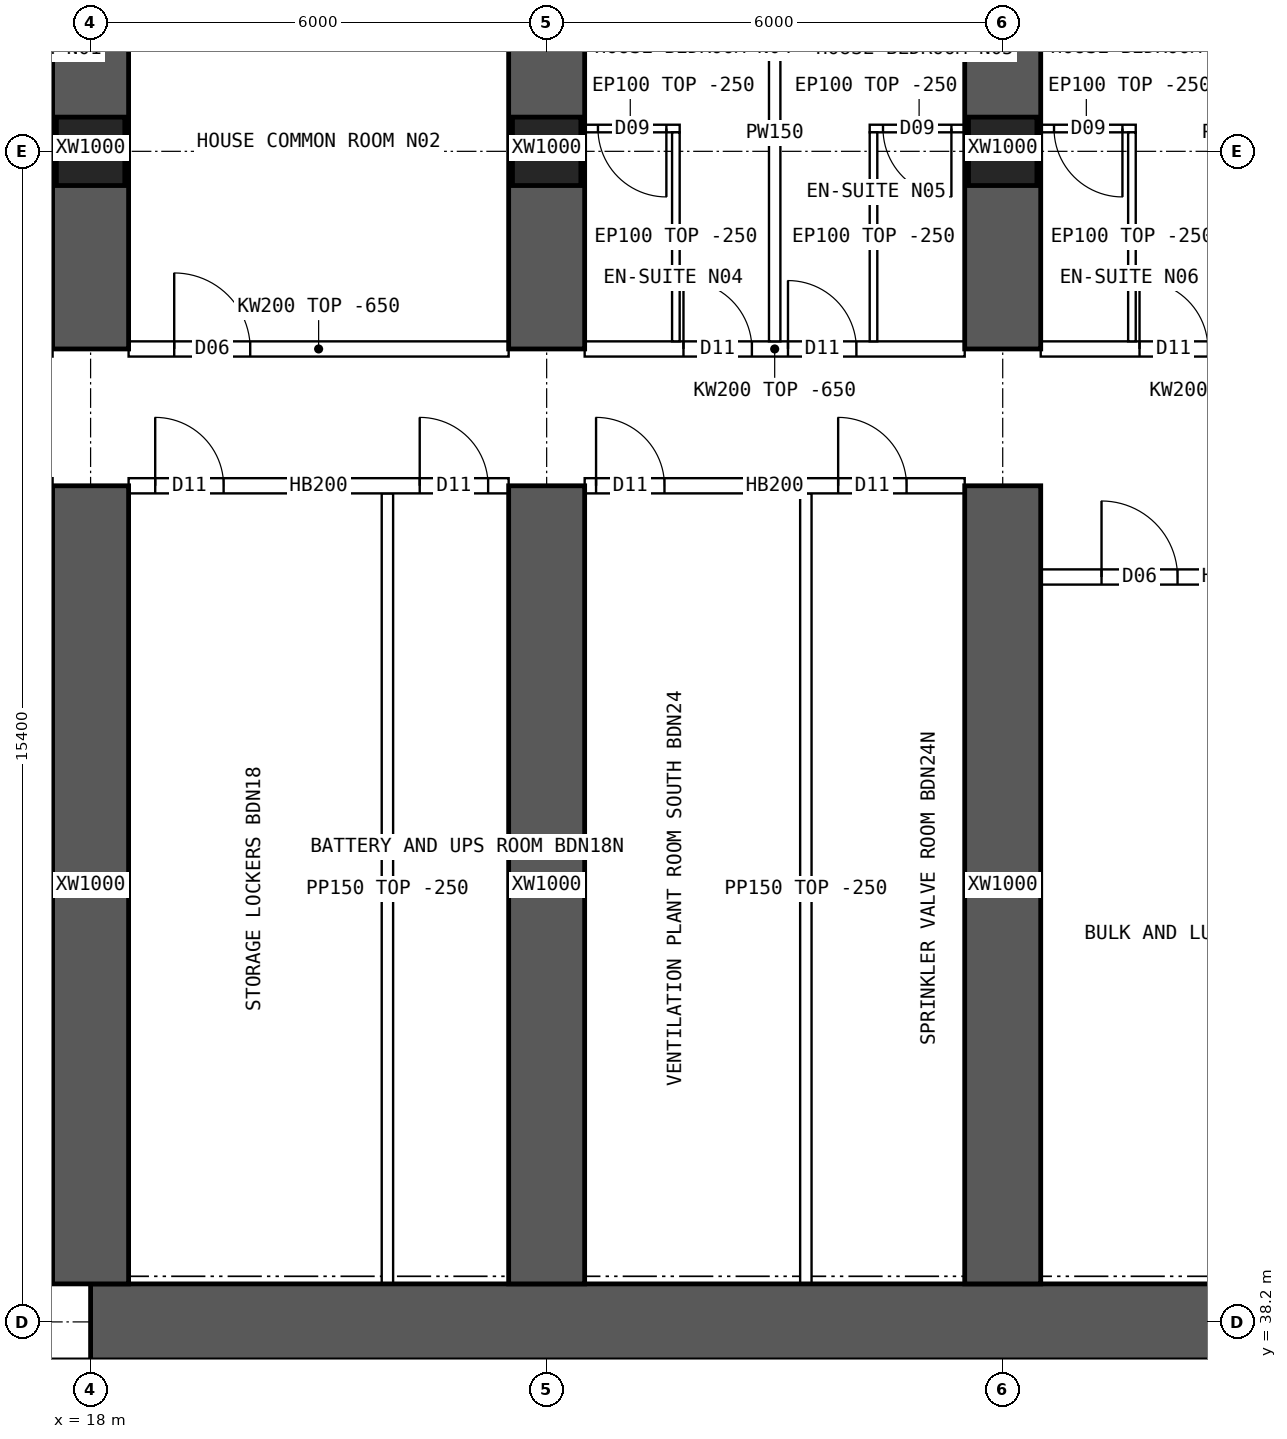
"""IFC4 building model, lengths in metres.
Left out: names, types, materials, properties, quantities, classifications, styles, units other than length and angle.
Written with IfcOpenShell. Run it as: python <this file> out.ifc"""

import sys

from ifc_helpers import new_model, si_unit, direction, frame, frame_2d, origin, origin_2d, place, context, subcontext, project, spatial, polyline, rectangle, hollow_rectangle, outline, extrude, element, fill, save


model = new_model("IFC4")
c1 = context("Model", 3, precision=1e-05, world=origin(), true_north=direction((0.0, 1.0)))
c2 = subcontext(c1, "Body", "Model", "MODEL_VIEW")
j1 = project(units=[si_unit("LENGTHUNIT", "METRE"), si_unit("PLANEANGLEUNIT", "RADIAN")], contexts=[c1])
p1 = place(None, origin())
s1 = spatial("IfcSite", under=j1, at=p1, CompositionType="ELEMENT")
p2 = place(p1, origin())
s2 = spatial("IfcBuilding", under=s1, at=p2, CompositionType="ELEMENT")
p3 = place(p2, frame((0.0, 0.0, 46.45)))
s3 = spatial("IfcBuildingStorey", under=s2, at=p3, CompositionType="ELEMENT", Elevation=46.45)
for number, where, z_axis, x_axis in (
    (1, (18.0, 53.6, 0.0), (0.0, 0.0, 1.0), (1.0, 0.0, 0.0)),
    (2, (24.0, 53.6, 0.0), (0.0, 0.0, 1.0), (1.0, 0.0, 0.0)),
    (3, (30.0, 53.6, 0.0), (0.0, 0.0, 1.0), (1.0, 0.0, 0.0)),
):
    element("IfcColumn", number, at=place(p3, frame(where, z_axis=z_axis, x_axis=x_axis)), inside=s3, PredefinedType="COLUMN", context=c2, shape_type="SweptSolid", body=[
        extrude(hollow_rectangle(XDim=0.9, YDim=0.9, WallThickness=0.09, at=origin_2d()), origin(), (0.0, 0.0, 1.0), 3.75),
    ])
p4 = place(p3, frame((18.0, 38.2, 0.0), z_axis=(0.0, 0.0, 1.0), x_axis=(1.0, 0.0, 0.0)))
e4 = element("IfcWall", 4, at=p4, inside=s3, PredefinedType="SHEAR", context=c2, shape_type="SweptSolid", body=[
    extrude(rectangle(XDim=48.0, YDim=1.0, at=frame_2d((24.0, 0.0))), origin(), (0.0, 0.0, 1.0), 3.75),
])
for number, where, z_axis, x_axis in (
    (5, (21.6, 34.75, 0.0), (0.0, 0.0, 1.0), (0.0, 1.0, 0.0)),
    (6, (26.0, 34.75, 0.0), (0.0, 0.0, 1.0), (0.0, 1.0, 0.0)),
):
    element("IfcWall", number, at=place(p3, frame(where, z_axis=z_axis, x_axis=x_axis)), inside=s3, PredefinedType="SHEAR", context=c2, shape_type="SweptSolid", body=[
        extrude(rectangle(XDim=2.95, YDim=0.3, at=frame_2d((1.475, 0.0))), origin(), (0.0, 0.0, 1.0), 3.75),
    ])
p5 = place(p3, frame((18.0, 51.0, 0.0), z_axis=(0.0, 0.0, 1.0), x_axis=(0.0, 1.0, 0.0)))
e7 = element("IfcWall", 7, at=p5, inside=s3, PredefinedType="SHEAR", context=c2, shape_type="SweptSolid", body=[
    extrude(rectangle(XDim=5.3, YDim=1.0, at=frame_2d((2.65, 0.0))), origin(), (0.0, 0.0, 1.0), 3.75),
])
p6 = place(p3, frame((18.0, 38.7, 0.0), z_axis=(0.0, 0.0, 1.0), x_axis=(0.0, 1.0, 0.0)))
e8 = element("IfcWall", 8, at=p6, inside=s3, PredefinedType="SHEAR", context=c2, shape_type="SweptSolid", body=[
    extrude(rectangle(XDim=10.5, YDim=1.0, at=frame_2d((5.25, 0.0))), origin(), (0.0, 0.0, 1.0), 3.75),
])
p7 = place(p3, frame((24.0, 51.0, 0.0), z_axis=(0.0, 0.0, 1.0), x_axis=(0.0, 1.0, 0.0)))
e9 = element("IfcWall", 9, at=p7, inside=s3, PredefinedType="SHEAR", context=c2, shape_type="SweptSolid", body=[
    extrude(rectangle(XDim=5.3, YDim=1.0, at=frame_2d((2.65, 0.0))), origin(), (0.0, 0.0, 1.0), 3.75),
])
p8 = place(p3, frame((24.0, 38.7, 0.0), z_axis=(0.0, 0.0, 1.0), x_axis=(0.0, 1.0, 0.0)))
e10 = element("IfcWall", 10, at=p8, inside=s3, PredefinedType="SHEAR", context=c2, shape_type="SweptSolid", body=[
    extrude(rectangle(XDim=10.5, YDim=1.0, at=frame_2d((5.25, 0.0))), origin(), (0.0, 0.0, 1.0), 3.75),
])
p9 = place(p3, frame((30.0, 51.0, 0.0), z_axis=(0.0, 0.0, 1.0), x_axis=(0.0, 1.0, 0.0)))
e11 = element("IfcWall", 11, at=p9, inside=s3, PredefinedType="SHEAR", context=c2, shape_type="SweptSolid", body=[
    extrude(rectangle(XDim=5.3, YDim=1.0, at=frame_2d((2.65, 0.0))), origin(), (0.0, 0.0, 1.0), 3.75),
])
p10 = place(p3, frame((30.0, 38.7, 0.0), z_axis=(0.0, 0.0, 1.0), x_axis=(0.0, 1.0, 0.0)))
e12 = element("IfcWall", 12, at=p10, inside=s3, PredefinedType="SHEAR", context=c2, shape_type="SweptSolid", body=[
    extrude(rectangle(XDim=10.5, YDim=1.0, at=frame_2d((5.25, 0.0))), origin(), (0.0, 0.0, 1.0), 3.75),
])
p11 = place(p3, frame((29.651, 34.75, 0.0), z_axis=(0.0, 0.0, 1.0), x_axis=(0.0, 1.0, 0.0)))
e13 = element("IfcWall", 13, at=p11, inside=s3, PredefinedType="SOLIDWALL", context=c2, shape_type="SweptSolid", body=[
    extrude(rectangle(XDim=2.95, YDim=0.15, at=frame_2d((1.475, 0.0))), origin(), (0.0, 0.0, 1.0), 3.5),
])
p12 = place(p3, frame((18.5, 51.0, 0.0), z_axis=(0.0, 0.0, 1.0), x_axis=(1.0, 0.0, 0.0)))
e14 = element("IfcWall", 14, at=p12, inside=s3, PredefinedType="SOLIDWALL", context=c2, shape_type="SweptSolid", body=[
    extrude(outline(polyline([(0.0, 0.0), (5.0, 0.0), (5.0, 3.1), (0.0, 3.1), (0.0, 0.0)])), frame((0.0, 0.1, 0.0), z_axis=(0.0, -1.0, 0.0), x_axis=(1.0, 0.0, 0.0)), (0.0, 0.0, 1.0), 0.2),
])
p13 = place(p12, frame((0.6, 0.0, 0.0)))
e15 = element("IfcOpeningElement", 15, at=p13, cuts=e14, PredefinedType="OPENING", context=c2, shape_type="SweptSolid", body=[
    extrude(rectangle(XDim=1.0, YDim=2.1, at=frame_2d((0.5, 1.05))), frame((0.0, 0.11, 0.0), z_axis=(0.0, -1.0, 0.0), x_axis=(1.0, 0.0, 0.0)), (0.0, 0.0, 1.0), 0.22),
])
p14 = place(p3, frame((18.5, 49.2, 0.0), z_axis=(0.0, 0.0, 1.0), x_axis=(1.0, 0.0, 0.0)))
e16 = element("IfcWall", 16, at=p14, inside=s3, PredefinedType="SOLIDWALL", context=c2, shape_type="SweptSolid", body=[
    extrude(rectangle(XDim=5.0, YDim=0.2, at=frame_2d((2.5, 0.0))), origin(), (0.0, 0.0, 1.0), 3.5),
])
p15 = place(p14, frame((0.35, 0.0, 0.0)))
e17 = element("IfcOpeningElement", 17, at=p15, cuts=e16, PredefinedType="OPENING", context=c2, shape_type="SweptSolid", body=[
    extrude(rectangle(XDim=0.9, YDim=2.1, at=frame_2d((0.45, 1.05))), frame((0.0, 0.11, 0.0), z_axis=(0.0, -1.0, 0.0), x_axis=(1.0, 0.0, 0.0)), (0.0, 0.0, 1.0), 0.22),
])
p16 = place(p14, frame((3.83, 0.0, 0.0)))
e18 = element("IfcOpeningElement", 18, at=p16, cuts=e16, PredefinedType="OPENING", context=c2, shape_type="SweptSolid", body=[
    extrude(rectangle(XDim=0.9, YDim=2.1, at=frame_2d((0.45, 1.05))), frame((0.0, 0.11, 0.0), z_axis=(0.0, -1.0, 0.0), x_axis=(1.0, 0.0, 0.0)), (0.0, 0.0, 1.0), 0.22),
])
p17 = place(p3, frame((24.5, 51.0, 0.0), z_axis=(0.0, 0.0, 1.0), x_axis=(1.0, 0.0, 0.0)))
e19 = element("IfcWall", 19, at=p17, inside=s3, PredefinedType="SOLIDWALL", context=c2, shape_type="SweptSolid", body=[
    extrude(outline(polyline([(0.0, 0.0), (5.0, 0.0), (5.0, 3.1), (0.0, 3.1), (0.0, 0.0)])), frame((0.0, 0.1, 0.0), z_axis=(0.0, -1.0, 0.0), x_axis=(1.0, 0.0, 0.0)), (0.0, 0.0, 1.0), 0.2),
])
p18 = place(p17, frame((1.3, 0.0, 0.0)))
e20 = element("IfcOpeningElement", 20, at=p18, cuts=e19, PredefinedType="OPENING", context=c2, shape_type="SweptSolid", body=[
    extrude(rectangle(XDim=0.9, YDim=2.1, at=frame_2d((0.45, 1.05))), frame((0.0, 0.11, 0.0), z_axis=(0.0, -1.0, 0.0), x_axis=(1.0, 0.0, 0.0)), (0.0, 0.0, 1.0), 0.22),
])
p19 = place(p17, frame((2.675, 0.0, 0.0)))
e21 = element("IfcOpeningElement", 21, at=p19, cuts=e19, PredefinedType="OPENING", context=c2, shape_type="SweptSolid", body=[
    extrude(rectangle(XDim=0.9, YDim=2.1, at=frame_2d((0.45, 1.05))), frame((0.0, 0.11, 0.0), z_axis=(0.0, -1.0, 0.0), x_axis=(1.0, 0.0, 0.0)), (0.0, 0.0, 1.0), 0.22),
])
p20 = place(p3, frame((24.5, 49.2, 0.0), z_axis=(0.0, 0.0, 1.0), x_axis=(1.0, 0.0, 0.0)))
e22 = element("IfcWall", 22, at=p20, inside=s3, PredefinedType="SOLIDWALL", context=c2, shape_type="SweptSolid", body=[
    extrude(rectangle(XDim=5.0, YDim=0.2, at=frame_2d((2.5, 0.0))), origin(), (0.0, 0.0, 1.0), 3.5),
])
p21 = place(p20, frame((0.15, 0.0, 0.0)))
e23 = element("IfcOpeningElement", 23, at=p21, cuts=e22, PredefinedType="OPENING", context=c2, shape_type="SweptSolid", body=[
    extrude(rectangle(XDim=0.9, YDim=2.1, at=frame_2d((0.45, 1.05))), frame((0.0, 0.11, 0.0), z_axis=(0.0, -1.0, 0.0), x_axis=(1.0, 0.0, 0.0)), (0.0, 0.0, 1.0), 0.22),
])
p22 = place(p20, frame((3.335, 0.0, 0.0)))
e24 = element("IfcOpeningElement", 24, at=p22, cuts=e22, PredefinedType="OPENING", context=c2, shape_type="SweptSolid", body=[
    extrude(rectangle(XDim=0.9, YDim=2.1, at=frame_2d((0.45, 1.05))), frame((0.0, 0.11, 0.0), z_axis=(0.0, -1.0, 0.0), x_axis=(1.0, 0.0, 0.0)), (0.0, 0.0, 1.0), 0.22),
])
p23 = place(p3, frame((30.5, 51.0, 0.0), z_axis=(0.0, 0.0, 1.0), x_axis=(1.0, 0.0, 0.0)))
e25 = element("IfcWall", 25, at=p23, inside=s3, PredefinedType="SOLIDWALL", context=c2, shape_type="SweptSolid", body=[
    extrude(outline(polyline([(0.0, 0.0), (5.0, 0.0), (5.0, 3.1), (0.0, 3.1), (0.0, 0.0)])), frame((0.0, 0.1, 0.0), z_axis=(0.0, -1.0, 0.0), x_axis=(1.0, 0.0, 0.0)), (0.0, 0.0, 1.0), 0.2),
])
p24 = place(p23, frame((1.3, 0.0, 0.0)))
e26 = element("IfcOpeningElement", 26, at=p24, cuts=e25, PredefinedType="OPENING", context=c2, shape_type="SweptSolid", body=[
    extrude(rectangle(XDim=0.9, YDim=2.1, at=frame_2d((0.45, 1.05))), frame((0.0, 0.11, 0.0), z_axis=(0.0, -1.0, 0.0), x_axis=(1.0, 0.0, 0.0)), (0.0, 0.0, 1.0), 0.22),
])
p25 = place(p23, frame((2.675, 0.0, 0.0)))
e27 = element("IfcOpeningElement", 27, at=p25, cuts=e25, PredefinedType="OPENING", context=c2, shape_type="SweptSolid", body=[
    extrude(rectangle(XDim=0.9, YDim=2.1, at=frame_2d((0.45, 1.05))), frame((0.0, 0.11, 0.0), z_axis=(0.0, -1.0, 0.0), x_axis=(1.0, 0.0, 0.0)), (0.0, 0.0, 1.0), 0.22),
])
p26 = place(p3, frame((16.25, 53.9, 0.0), z_axis=(0.0, 0.0, 1.0), x_axis=(1.0, 0.0, 0.0)))
e28 = element("IfcWall", 28, at=p26, inside=s3, PredefinedType="PARTITIONING", context=c2, shape_type="SweptSolid", body=[
    extrude(rectangle(XDim=1.3, YDim=0.1, at=frame_2d((0.65, 0.0))), origin(), (0.0, 0.0, 1.0), 3.5),
])
p27 = place(p26, frame((0.175, 0.0, 0.0)))
e29 = element("IfcOpeningElement", 29, at=p27, cuts=e28, PredefinedType="OPENING", context=c2, shape_type="SweptSolid", body=[
    extrude(rectangle(XDim=0.9, YDim=2.1, at=frame_2d((0.45, 1.05))), frame((0.0, 0.06, 0.0), z_axis=(0.0, -1.0, 0.0), x_axis=(1.0, 0.0, 0.0)), (0.0, 0.0, 1.0), 0.12),
])
p28 = place(p3, frame((27.0, 56.59, 0.0), z_axis=(0.0, 0.0, 1.0), x_axis=(0.0, -1.0, 0.0)))
e30 = element("IfcWall", 30, at=p28, inside=s3, PredefinedType="PARTITIONING", context=c2, shape_type="SweptSolid", body=[
    extrude(outline(polyline([(0.0, 0.0), (5.49, 0.0), (5.49, 3.1), (5.442, 3.1), (5.44, 3.5), (3.192, 3.5), (3.19, 3.1), (2.792, 3.1), (2.79, 3.5), (0.0, 3.5), (0.0, 0.0)])), frame((0.0, 0.075, 0.0), z_axis=(0.0, -1.0, 0.0), x_axis=(1.0, 0.0, 0.0)), (0.0, 0.0, 1.0), 0.15),
])
p29 = place(p3, frame((24.45, 53.9, 0.0), z_axis=(0.0, 0.0, 1.0), x_axis=(1.0, 0.0, 0.0)))
e31 = element("IfcWall", 31, at=p29, inside=s3, PredefinedType="PARTITIONING", context=c2, shape_type="SweptSolid", body=[
    extrude(rectangle(XDim=1.3, YDim=0.1, at=frame_2d((0.65, 0.0))), origin(), (0.0, 0.0, 1.0), 3.5),
])
p30 = place(p29, frame((0.225, 0.0, 0.0)))
e32 = element("IfcOpeningElement", 32, at=p30, cuts=e31, PredefinedType="OPENING", context=c2, shape_type="SweptSolid", body=[
    extrude(rectangle(XDim=0.9, YDim=2.1, at=frame_2d((0.45, 1.05))), frame((0.0, 0.06, 0.0), z_axis=(0.0, -1.0, 0.0), x_axis=(1.0, 0.0, 0.0)), (0.0, 0.0, 1.0), 0.12),
])
p31 = place(p3, frame((25.7, 53.85, 0.0), z_axis=(0.0, 0.0, 1.0), x_axis=(0.0, -1.0, 0.0)))
e33 = element("IfcWall", 33, at=p31, inside=s3, PredefinedType="PARTITIONING", context=c2, shape_type="SweptSolid", body=[
    extrude(outline(polyline([(0.0, 0.0), (2.75, 0.0), (2.75, 3.1), (2.702, 3.1), (2.7, 3.5), (0.452, 3.5), (0.45, 3.1), (0.0, 3.1), (0.0, 0.0)])), frame((0.0, 0.05, 0.0), z_axis=(0.0, -1.0, 0.0), x_axis=(1.0, 0.0, 0.0)), (0.0, 0.0, 1.0), 0.1),
])
p32 = place(p3, frame((28.25, 53.9, 0.0), z_axis=(0.0, 0.0, 1.0), x_axis=(1.0, 0.0, 0.0)))
e34 = element("IfcWall", 34, at=p32, inside=s3, PredefinedType="PARTITIONING", context=c2, shape_type="SweptSolid", body=[
    extrude(rectangle(XDim=1.3, YDim=0.1, at=frame_2d((0.65, 0.0))), origin(), (0.0, 0.0, 1.0), 3.5),
])
p33 = place(p32, frame((0.175, 0.0, 0.0)))
e35 = element("IfcOpeningElement", 35, at=p33, cuts=e34, PredefinedType="OPENING", context=c2, shape_type="SweptSolid", body=[
    extrude(rectangle(XDim=0.9, YDim=2.1, at=frame_2d((0.45, 1.05))), frame((0.0, 0.06, 0.0), z_axis=(0.0, -1.0, 0.0), x_axis=(1.0, 0.0, 0.0)), (0.0, 0.0, 1.0), 0.12),
])
p34 = place(p3, frame((28.3, 53.85, 0.0), z_axis=(0.0, 0.0, 1.0), x_axis=(0.0, -1.0, 0.0)))
e36 = element("IfcWall", 36, at=p34, inside=s3, PredefinedType="PARTITIONING", context=c2, shape_type="SweptSolid", body=[
    extrude(outline(polyline([(0.0, 0.0), (2.75, 0.0), (2.75, 3.1), (2.702, 3.1), (2.7, 3.5), (0.452, 3.5), (0.45, 3.1), (0.0, 3.1), (0.0, 0.0)])), frame((0.0, 0.05, 0.0), z_axis=(0.0, -1.0, 0.0), x_axis=(1.0, 0.0, 0.0)), (0.0, 0.0, 1.0), 0.1),
])
p35 = place(p3, frame((30.45, 53.9, 0.0), z_axis=(0.0, 0.0, 1.0), x_axis=(1.0, 0.0, 0.0)))
e37 = element("IfcWall", 37, at=p35, inside=s3, PredefinedType="PARTITIONING", context=c2, shape_type="SweptSolid", body=[
    extrude(rectangle(XDim=1.3, YDim=0.1, at=frame_2d((0.65, 0.0))), origin(), (0.0, 0.0, 1.0), 3.5),
])
p36 = place(p35, frame((0.225, 0.0, 0.0)))
e38 = element("IfcOpeningElement", 38, at=p36, cuts=e37, PredefinedType="OPENING", context=c2, shape_type="SweptSolid", body=[
    extrude(rectangle(XDim=0.9, YDim=2.1, at=frame_2d((0.45, 1.05))), frame((0.0, 0.06, 0.0), z_axis=(0.0, -1.0, 0.0), x_axis=(1.0, 0.0, 0.0)), (0.0, 0.0, 1.0), 0.12),
])
p37 = place(p3, frame((31.7, 53.85, 0.0), z_axis=(0.0, 0.0, 1.0), x_axis=(0.0, -1.0, 0.0)))
e39 = element("IfcWall", 39, at=p37, inside=s3, PredefinedType="PARTITIONING", context=c2, shape_type="SweptSolid", body=[
    extrude(outline(polyline([(0.0, 0.0), (2.75, 0.0), (2.75, 3.1), (2.702, 3.1), (2.7, 3.5), (0.452, 3.5), (0.45, 3.1), (0.0, 3.1), (0.0, 0.0)])), frame((0.0, 0.05, 0.0), z_axis=(0.0, -1.0, 0.0), x_axis=(1.0, 0.0, 0.0)), (0.0, 0.0, 1.0), 0.1),
])
for number, where, z_axis, x_axis in (
    (40, (21.905, 38.7, 0.0), (0.0, 0.0, 1.0), (0.0, 1.0, 0.0)),
    (41, (27.41, 38.7, 0.0), (0.0, 0.0, 1.0), (0.0, 1.0, 0.0)),
):
    element("IfcWall", number, at=place(p3, frame(where, z_axis=z_axis, x_axis=x_axis)), inside=s3, PredefinedType="PARTITIONING", context=c2, shape_type="SweptSolid", body=[
        extrude(rectangle(XDim=10.4, YDim=0.15, at=frame_2d((5.2, 0.0))), origin(), (0.0, 0.0, 1.0), 3.5),
    ])
p38 = place(p3, frame((30.5, 48.0, 0.0), z_axis=(0.0, 0.0, 1.0), x_axis=(1.0, 0.0, 0.0)))
e42 = element("IfcWall", 42, at=p38, inside=s3, PredefinedType="SOLIDWALL", context=c2, shape_type="SweptSolid", body=[
    extrude(rectangle(XDim=5.0, YDim=0.2, at=frame_2d((2.5, 0.0))), origin(), (0.0, 0.0, 1.0), 3.5),
])
p39 = place(p38, frame((0.8, 0.0, 0.0)))
e43 = element("IfcOpeningElement", 43, at=p39, cuts=e42, PredefinedType="OPENING", context=c2, shape_type="SweptSolid", body=[
    extrude(rectangle(XDim=1.0, YDim=2.1, at=frame_2d((0.5, 1.05))), frame((0.0, 0.11, 0.0), z_axis=(0.0, -1.0, 0.0), x_axis=(1.0, 0.0, 0.0)), (0.0, 0.0, 1.0), 0.22),
])
p40 = place(p13, origin())
e44 = element("IfcDoor", 44, at=p40, inside=s3, OperationType="SINGLE_SWING_LEFT", PredefinedType="DOOR", context=c2, shape_type="SweptSolid", body=[
    extrude(rectangle(XDim=1.0, YDim=2.1, at=frame_2d((0.5, 1.05))), frame((0.0, 0.025, 0.0), z_axis=(0.0, -1.0, 0.0), x_axis=(1.0, 0.0, 0.0)), (0.0, 0.0, 1.0), 0.05),
])
fill(e15, e44)
p41 = place(p30, origin())
e45 = element("IfcDoor", 45, at=p41, inside=s3, OperationType="SINGLE_SWING_RIGHT", PredefinedType="DOOR", context=c2, shape_type="SweptSolid", body=[
    extrude(rectangle(XDim=0.9, YDim=2.1, at=frame_2d((0.45, 1.05))), frame((0.0, 0.025, 0.0), z_axis=(0.0, -1.0, 0.0), x_axis=(1.0, 0.0, 0.0)), (0.0, 0.0, 1.0), 0.05),
])
fill(e32, e45)
p42 = place(p18, origin())
e46 = element("IfcDoor", 46, at=p42, inside=s3, OperationType="SINGLE_SWING_LEFT", PredefinedType="DOOR", context=c2, shape_type="SweptSolid", body=[
    extrude(rectangle(XDim=0.9, YDim=2.1, at=frame_2d((0.45, 1.05))), frame((0.0, 0.025, 0.0), z_axis=(0.0, -1.0, 0.0), x_axis=(1.0, 0.0, 0.0)), (0.0, 0.0, 1.0), 0.05),
])
fill(e20, e46)
p43 = place(p33, origin())
e47 = element("IfcDoor", 47, at=p43, inside=s3, OperationType="SINGLE_SWING_RIGHT", PredefinedType="DOOR", context=c2, shape_type="SweptSolid", body=[
    extrude(rectangle(XDim=0.9, YDim=2.1, at=frame_2d((0.45, 1.05))), frame((0.0, 0.025, 0.0), z_axis=(0.0, -1.0, 0.0), x_axis=(1.0, 0.0, 0.0)), (0.0, 0.0, 1.0), 0.05),
])
fill(e35, e47)
p44 = place(p19, origin())
e48 = element("IfcDoor", 48, at=p44, inside=s3, OperationType="SINGLE_SWING_LEFT", PredefinedType="DOOR", context=c2, shape_type="SweptSolid", body=[
    extrude(rectangle(XDim=0.9, YDim=2.1, at=frame_2d((0.45, 1.05))), frame((0.0, 0.025, 0.0), z_axis=(0.0, -1.0, 0.0), x_axis=(1.0, 0.0, 0.0)), (0.0, 0.0, 1.0), 0.05),
])
fill(e21, e48)
p45 = place(p36, origin())
e49 = element("IfcDoor", 49, at=p45, inside=s3, OperationType="SINGLE_SWING_RIGHT", PredefinedType="DOOR", context=c2, shape_type="SweptSolid", body=[
    extrude(rectangle(XDim=0.9, YDim=2.1, at=frame_2d((0.45, 1.05))), frame((0.0, 0.025, 0.0), z_axis=(0.0, -1.0, 0.0), x_axis=(1.0, 0.0, 0.0)), (0.0, 0.0, 1.0), 0.05),
])
fill(e38, e49)
p46 = place(p24, origin())
e50 = element("IfcDoor", 50, at=p46, inside=s3, OperationType="SINGLE_SWING_LEFT", PredefinedType="DOOR", context=c2, shape_type="SweptSolid", body=[
    extrude(rectangle(XDim=0.9, YDim=2.1, at=frame_2d((0.45, 1.05))), frame((0.0, 0.025, 0.0), z_axis=(0.0, -1.0, 0.0), x_axis=(1.0, 0.0, 0.0)), (0.0, 0.0, 1.0), 0.05),
])
fill(e26, e50)
p47 = place(p15, origin())
e51 = element("IfcDoor", 51, at=p47, inside=s3, OperationType="SINGLE_SWING_LEFT", PredefinedType="DOOR", context=c2, shape_type="SweptSolid", body=[
    extrude(rectangle(XDim=0.9, YDim=2.1, at=frame_2d((0.45, 1.05))), frame((0.0, 0.025, 0.0), z_axis=(0.0, -1.0, 0.0), x_axis=(1.0, 0.0, 0.0)), (0.0, 0.0, 1.0), 0.05),
])
fill(e17, e51)
p48 = place(p16, origin())
e52 = element("IfcDoor", 52, at=p48, inside=s3, OperationType="SINGLE_SWING_LEFT", PredefinedType="DOOR", context=c2, shape_type="SweptSolid", body=[
    extrude(rectangle(XDim=0.9, YDim=2.1, at=frame_2d((0.45, 1.05))), frame((0.0, 0.025, 0.0), z_axis=(0.0, -1.0, 0.0), x_axis=(1.0, 0.0, 0.0)), (0.0, 0.0, 1.0), 0.05),
])
fill(e18, e52)
p49 = place(p21, origin())
e53 = element("IfcDoor", 53, at=p49, inside=s3, OperationType="SINGLE_SWING_LEFT", PredefinedType="DOOR", context=c2, shape_type="SweptSolid", body=[
    extrude(rectangle(XDim=0.9, YDim=2.1, at=frame_2d((0.45, 1.05))), frame((0.0, 0.025, 0.0), z_axis=(0.0, -1.0, 0.0), x_axis=(1.0, 0.0, 0.0)), (0.0, 0.0, 1.0), 0.05),
])
fill(e23, e53)
p50 = place(p22, origin())
e54 = element("IfcDoor", 54, at=p50, inside=s3, OperationType="SINGLE_SWING_LEFT", PredefinedType="DOOR", context=c2, shape_type="SweptSolid", body=[
    extrude(rectangle(XDim=0.9, YDim=2.1, at=frame_2d((0.45, 1.05))), frame((0.0, 0.025, 0.0), z_axis=(0.0, -1.0, 0.0), x_axis=(1.0, 0.0, 0.0)), (0.0, 0.0, 1.0), 0.05),
])
fill(e24, e54)
p51 = place(p39, origin())
e55 = element("IfcDoor", 55, at=p51, inside=s3, OperationType="SINGLE_SWING_LEFT", PredefinedType="DOOR", context=c2, shape_type="SweptSolid", body=[
    extrude(rectangle(XDim=1.0, YDim=2.1, at=frame_2d((0.5, 1.05))), frame((0.0, 0.025, 0.0), z_axis=(0.0, -1.0, 0.0), x_axis=(1.0, 0.0, 0.0)), (0.0, 0.0, 1.0), 0.05),
])
fill(e43, e55)
save(model, sys.argv[1])
